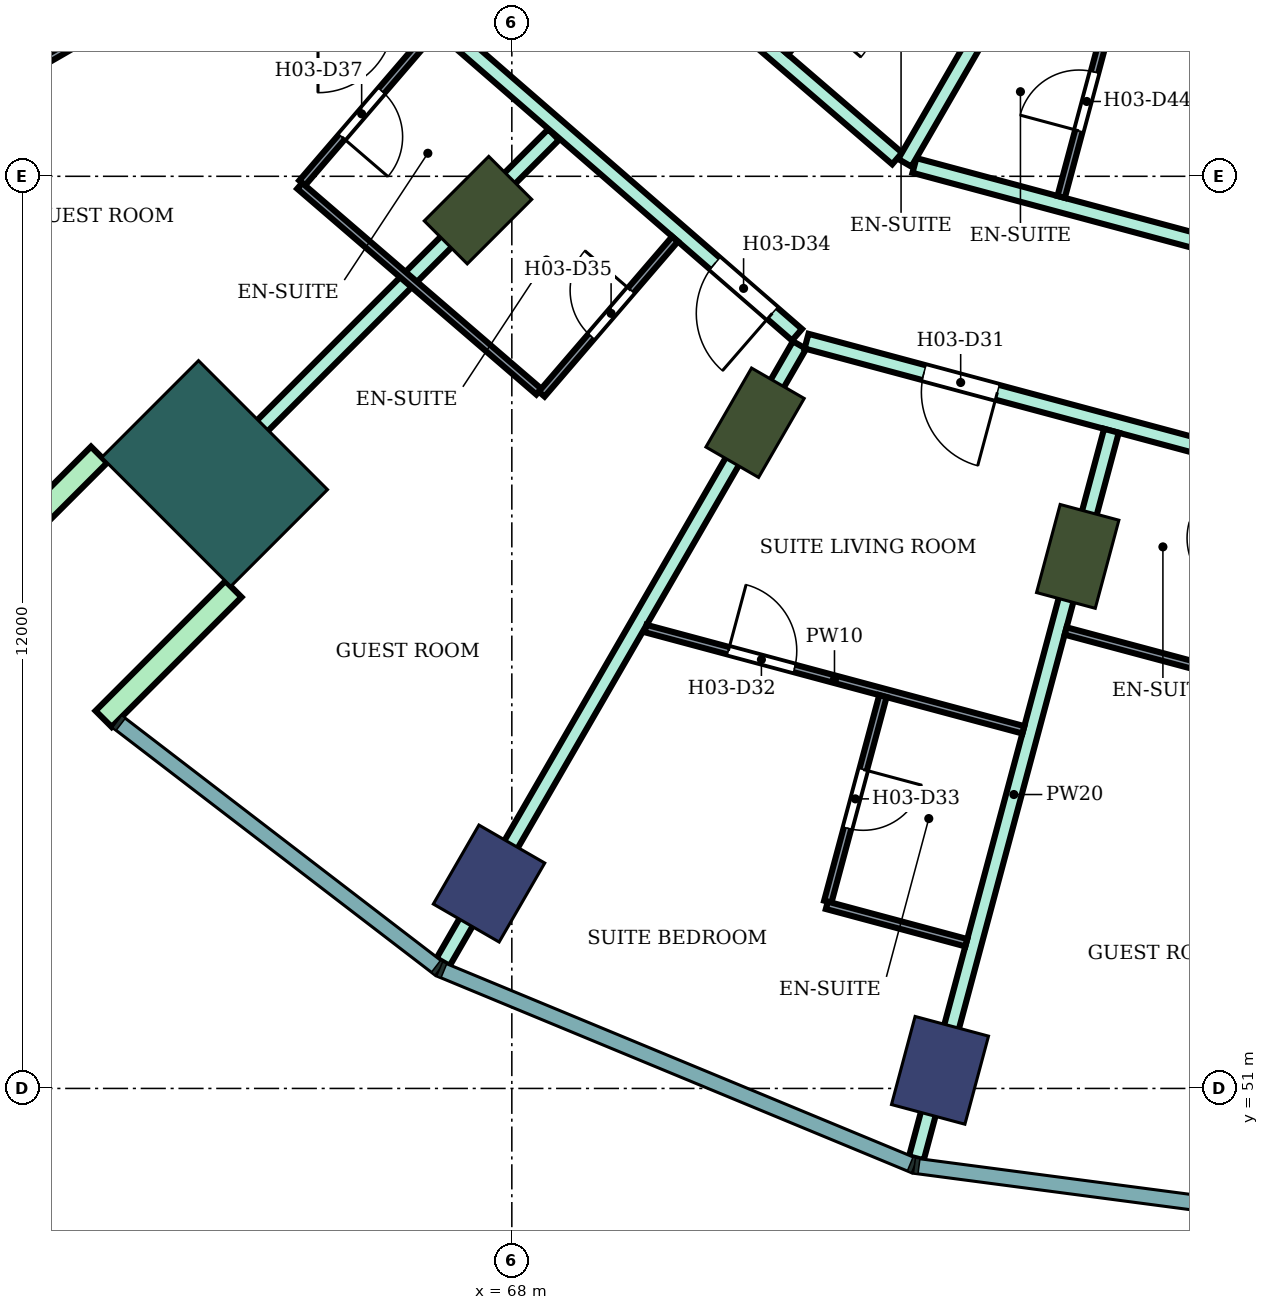
"""IFC4 building model, lengths in metres.
Left out: names, types, materials, properties, quantities, classifications, styles, units other than length and angle.
Written with IfcOpenShell. Run it as: python <this file> out.ifc"""

import sys

from ifc_helpers import new_model, si_unit, direction, frame, frame_2d, origin, origin_2d, place, context, subcontext, project, spatial, rectangle, extrude, element, fill, save


model = new_model("IFC4")
c1 = context("Model", 3, precision=1e-05, world=origin(), true_north=direction((0.0, 1.0)))
c2 = subcontext(c1, "Body", "Model", "MODEL_VIEW")
j1 = project(units=[si_unit("LENGTHUNIT", "METRE"), si_unit("PLANEANGLEUNIT", "RADIAN")], contexts=[c1])
p1 = place(None, origin())
s1 = spatial("IfcSite", under=j1, at=p1, CompositionType="ELEMENT")
p2 = place(p1, origin())
s2 = spatial("IfcBuilding", under=s1, at=p2, CompositionType="ELEMENT")
p3 = place(p2, frame((0.0, 0.0, 59.2)))
s3 = spatial("IfcBuildingStorey", under=s2, at=p3, CompositionType="ELEMENT", Elevation=59.2)
for number, where, z_axis, x_axis in (
    (1, (67.7, 53.696, 0.0), (0.0, 0.0, 1.0), (-0.5, -0.866, 0.0)),
    (2, (73.633, 51.238, 0.0), (0.0, 0.0, 1.0), (-0.259, -0.966, 0.0)),
):
    element("IfcColumn", number, at=place(p3, frame(where, z_axis=z_axis, x_axis=x_axis)), inside=s3, PredefinedType="COLUMN", context=c2, shape_type="SweptSolid", body=[
        extrude(rectangle(XDim=1.2, YDim=1.0, at=origin_2d()), origin(), (0.0, 0.0, 1.0), 3.8),
    ])
for number, where, z_axis, x_axis in (
    (3, (67.555, 62.555, 0.0), (0.0, 0.0, 1.0), (-0.707, -0.707, 0.0)),
    (4, (71.2, 59.758, 0.0), (0.0, 0.0, 1.0), (-0.5, -0.866, 0.0)),
    (5, (75.445, 58.0, 0.0), (0.0, 0.0, 1.0), (-0.259, -0.966, 0.0)),
):
    element("IfcColumn", number, at=place(p3, frame(where, z_axis=z_axis, x_axis=x_axis)), inside=s3, PredefinedType="COLUMN", context=c2, shape_type="SweptSolid", body=[
        extrude(rectangle(XDim=1.2, YDim=0.8, at=origin_2d()), origin(), (0.0, 0.0, 1.0), 3.8),
    ])
p4 = place(p3, frame((64.09, 59.09, 0.0), z_axis=(0.0, 0.0, 1.0), x_axis=(-0.707106781187, -0.707106781187, 0.0)))
e6 = element("IfcColumn", 6, at=p4, inside=s3, PredefinedType="COLUMN", context=c2, shape_type="SweptSolid", body=[
    extrude(rectangle(XDim=1.8, YDim=2.4, at=origin_2d()), origin(), (0.0, 0.0, 1.0), 3.8),
])
for number, where, z_axis, x_axis in (
    (7, (62.57, 59.338, 0.0), (0.0, 0.0, 1.0), (-0.707, -0.707, 0.0)),
    (8, (64.338, 57.57, 0.0), (0.0, 0.0, 1.0), (-0.707, -0.707, 0.0)),
):
    element("IfcWall", number, at=place(p3, frame(where, z_axis=z_axis, x_axis=x_axis)), inside=s3, PredefinedType="NOTDEFINED", context=c2, shape_type="SweptSolid", body=[
        extrude(rectangle(XDim=2.416, YDim=0.3, at=frame_2d((1.208, 0.0))), origin(), (0.0, 0.0, 1.0), 3.8),
    ])
p5 = place(p3, frame((63.596, 58.596, 0.0), z_axis=(0.0, 0.0, 1.0), x_axis=(0.707106781187, 0.707106781187, 0.0)))
e9 = element("IfcWall", 9, at=p5, inside=s3, PredefinedType="PARTITIONING", context=c2, shape_type="SweptSolid", body=[
    extrude(rectangle(XDim=7.005, YDim=0.2, at=frame_2d((3.503, 0.0))), origin(), (0.0, 0.0, 1.0), 3.35),
])
p6 = place(p3, frame((67.081, 64.971, 0.0), z_axis=(0.0, 0.0, 1.0), x_axis=(0.755031061605, -0.65568902386, 0.0)))
e10 = element("IfcWall", 10, at=p6, inside=s3, PredefinedType="PARTITIONING", context=c2, shape_type="SweptSolid", body=[
    extrude(rectangle(XDim=6.186, YDim=0.2, at=frame_2d((3.093, 0.0))), origin(), (0.0, 0.0, 1.0), 3.35),
])
p7 = place(p6, frame((4.755, 0.0, 0.0)))
e11 = element("IfcOpeningElement", 11, at=p7, cuts=e10, PredefinedType="OPENING", context=c2, shape_type="SweptSolid", body=[
    extrude(rectangle(XDim=1.0, YDim=2.1, at=frame_2d((0.5, 1.05))), frame((0.0, 0.11, 0.0), z_axis=(0.0, -1.0, 0.0), x_axis=(1.0, 0.0, 0.0)), (0.0, 0.0, 1.0), 0.22),
])
p8 = place(p3, frame((67.095, 52.662, 0.0), z_axis=(0.0, 0.0, 1.0), x_axis=(0.500247659952, 0.865882370021, 0.0)))
e12 = element("IfcWall", 12, at=p8, inside=s3, PredefinedType="PARTITIONING", context=c2, shape_type="SweptSolid", body=[
    extrude(rectangle(XDim=9.375, YDim=0.2, at=frame_2d((4.688, 0.0))), origin(), (0.0, 0.0, 1.0), 3.35),
])
p9 = place(p3, frame((69.158, 66.6, 0.0), z_axis=(0.0, 0.0, 1.0), x_axis=(0.757976058094, -0.652282373943, 0.0)))
e13 = element("IfcWall", 13, at=p9, inside=s3, PredefinedType="PARTITIONING", context=c2, shape_type="SweptSolid", body=[
    extrude(rectangle(XDim=5.16, YDim=0.2, at=frame_2d((2.58, 0.0))), origin(), (0.0, 0.0, 1.0), 3.35),
])
p10 = place(p9, frame((1.6, 0.0, 0.0)))
e14 = element("IfcOpeningElement", 14, at=p10, cuts=e13, PredefinedType="OPENING", context=c2, shape_type="SweptSolid", body=[
    extrude(rectangle(XDim=1.0, YDim=2.1, at=frame_2d((0.5, 1.05))), frame((0.0, 0.11, 0.0), z_axis=(0.0, -1.0, 0.0), x_axis=(1.0, 0.0, 0.0)), (0.0, 0.0, 1.0), 0.22),
])
p11 = place(p3, frame((71.877, 60.831, 0.0), z_axis=(0.0, 0.0, 1.0), x_axis=(0.965852509869, -0.259092510851, 0.0)))
e15 = element("IfcWall", 15, at=p11, inside=s3, PredefinedType="PARTITIONING", context=c2, shape_type="SweptSolid", body=[
    extrude(rectangle(XDim=8.32, YDim=0.2, at=frame_2d((4.16, 0.0))), origin(), (0.0, 0.0, 1.0), 3.35),
])
p12 = place(p11, frame((6.86, 0.0, 0.0)))
e16 = element("IfcOpeningElement", 16, at=p12, cuts=e15, PredefinedType="OPENING", context=c2, shape_type="SweptSolid", body=[
    extrude(rectangle(XDim=1.0, YDim=2.1, at=frame_2d((0.5, 1.05))), frame((0.0, 0.11, 0.0), z_axis=(0.0, -1.0, 0.0), x_axis=(1.0, 0.0, 0.0)), (0.0, 0.0, 1.0), 0.22),
])
p13 = place(p11, frame((1.6, 0.0, 0.0)))
e17 = element("IfcOpeningElement", 17, at=p13, cuts=e15, PredefinedType="OPENING", context=c2, shape_type="SweptSolid", body=[
    extrude(rectangle(XDim=1.0, YDim=2.1, at=frame_2d((0.5, 1.05))), frame((0.0, 0.11, 0.0), z_axis=(0.0, -1.0, 0.0), x_axis=(1.0, 0.0, 0.0)), (0.0, 0.0, 1.0), 0.22),
])
p14 = place(p3, frame((73.297, 63.143, 0.0), z_axis=(0.0, 0.0, 1.0), x_axis=(0.965859030528, -0.25906820173, 0.0)))
e18 = element("IfcWall", 18, at=p14, inside=s3, PredefinedType="PARTITIONING", context=c2, shape_type="SweptSolid", body=[
    extrude(rectangle(XDim=6.81, YDim=0.2, at=frame_2d((3.405, 0.0))), origin(), (0.0, 0.0, 1.0), 3.35),
])
p15 = place(p14, frame((5.39, 0.0, 0.0)))
e19 = element("IfcOpeningElement", 19, at=p15, cuts=e18, PredefinedType="OPENING", context=c2, shape_type="SweptSolid", body=[
    extrude(rectangle(XDim=1.0, YDim=2.1, at=frame_2d((0.5, 1.05))), frame((0.0, 0.11, 0.0), z_axis=(0.0, -1.0, 0.0), x_axis=(1.0, 0.0, 0.0)), (0.0, 0.0, 1.0), 0.22),
])
p16 = place(p3, frame((73.17, 63.177, 0.0), z_axis=(0.0, 0.0, 1.0), x_axis=(0.500239348149, 0.865887171959, 0.0)))
e20 = element("IfcWall", 20, at=p16, inside=s3, PredefinedType="PARTITIONING", context=c2, shape_type="SweptSolid", body=[
    extrude(rectangle(XDim=5.955, YDim=0.2, at=frame_2d((2.978, 0.0))), origin(), (0.0, 0.0, 1.0), 3.35),
])
p17 = place(p3, frame((73.322, 50.081, 0.0), z_axis=(0.0, 0.0, 1.0), x_axis=(0.25896431718, 0.965886889044, 0.0)))
e21 = element("IfcWall", 21, at=p17, inside=s3, PredefinedType="PARTITIONING", context=c2, shape_type="SweptSolid", body=[
    extrude(rectangle(XDim=9.909, YDim=0.2, at=frame_2d((4.955, 0.0))), origin(), (0.0, 0.0, 1.0), 3.35),
])
p18 = place(p3, frame((57.659, 62.101, 0.0), z_axis=(0.0, 0.0, 1.0), x_axis=(0.86602264145, 0.500004784474, 0.0)))
e22 = element("IfcWall", 22, at=p18, inside=s3, PredefinedType="PARTITIONING", context=c2, shape_type="SweptSolid", body=[
    extrude(rectangle(XDim=8.708, YDim=0.1, at=frame_2d((4.354, 0.0))), origin(), (0.0, 0.0, 1.0), 3.35),
])
p19 = place(p18, frame((3.929, 0.0, 0.0)))
e23 = element("IfcOpeningElement", 23, at=p19, cuts=e22, PredefinedType="OPENING", context=c2, shape_type="SweptSolid", body=[
    extrude(rectangle(XDim=0.9, YDim=2.1, at=frame_2d((0.45, 1.05))), frame((0.0, 0.06, 0.0), z_axis=(0.0, -1.0, 0.0), x_axis=(1.0, 0.0, 0.0)), (0.0, 0.0, 1.0), 0.12),
])
p20 = place(p3, frame((65.242, 62.912, 0.0), z_axis=(0.0, 0.0, 1.0), x_axis=(0.652069888227, 0.758158862553, 0.0)))
e24 = element("IfcWall", 24, at=p20, inside=s3, PredefinedType="PARTITIONING", context=c2, shape_type="SweptSolid", body=[
    extrude(rectangle(XDim=2.75, YDim=0.1, at=frame_2d((1.375, 0.0))), origin(), (0.0, 0.0, 1.0), 3.35),
])
p21 = place(p20, frame((0.8, 0.0, 0.0)))
e25 = element("IfcOpeningElement", 25, at=p21, cuts=e24, PredefinedType="OPENING", context=c2, shape_type="SweptSolid", body=[
    extrude(rectangle(XDim=0.8, YDim=2.1, at=frame_2d((0.4, 1.05))), frame((0.0, 0.06, 0.0), z_axis=(0.0, -1.0, 0.0), x_axis=(1.0, 0.0, 0.0)), (0.0, 0.0, 1.0), 0.12),
])
p22 = place(p3, frame((65.209, 62.875, 0.0), z_axis=(0.0, 0.0, 1.0), x_axis=(0.757930378138, -0.652335451969, 0.0)))
e26 = element("IfcWall", 26, at=p22, inside=s3, PredefinedType="PARTITIONING", context=c2, shape_type="SweptSolid", body=[
    extrude(rectangle(XDim=4.15, YDim=0.1, at=frame_2d((2.075, 0.0))), origin(), (0.0, 0.0, 1.0), 3.35),
])
p23 = place(p3, frame((68.393, 60.135, 0.0), z_axis=(0.0, 0.0, 1.0), x_axis=(0.652061182569, 0.758166349944, 0.0)))
e27 = element("IfcWall", 27, at=p23, inside=s3, PredefinedType="PARTITIONING", context=c2, shape_type="SweptSolid", body=[
    extrude(rectangle(XDim=2.69, YDim=0.1, at=frame_2d((1.345, 0.0))), origin(), (0.0, 0.0, 1.0), 3.35),
])
p24 = place(p23, frame((1.0, 0.0, 0.0)))
e28 = element("IfcOpeningElement", 28, at=p24, cuts=e27, PredefinedType="OPENING", context=c2, shape_type="SweptSolid", body=[
    extrude(rectangle(XDim=0.8, YDim=2.1, at=frame_2d((0.4, 1.05))), frame((0.0, 0.06, 0.0), z_axis=(0.0, -1.0, 0.0), x_axis=(1.0, 0.0, 0.0)), (0.0, 0.0, 1.0), 0.12),
])
p25 = place(p3, frame((69.76, 57.051, 0.0), z_axis=(0.0, 0.0, 1.0), x_axis=(0.965880475586, -0.258988236958, 0.0)))
e29 = element("IfcWall", 29, at=p25, inside=s3, PredefinedType="PARTITIONING", context=c2, shape_type="SweptSolid", body=[
    extrude(rectangle(XDim=5.146, YDim=0.1, at=frame_2d((2.573, 0.0))), origin(), (0.0, 0.0, 1.0), 3.35),
])
p26 = place(p25, frame((1.128, 0.0, 0.0)))
e30 = element("IfcOpeningElement", 30, at=p26, cuts=e29, PredefinedType="OPENING", context=c2, shape_type="SweptSolid", body=[
    extrude(rectangle(XDim=0.9, YDim=2.1, at=frame_2d((0.45, 1.05))), frame((0.0, 0.06, 0.0), z_axis=(0.0, -1.0, 0.0), x_axis=(1.0, 0.0, 0.0)), (0.0, 0.0, 1.0), 0.12),
])
p27 = place(p3, frame((71.596, 64.635, 0.0), z_axis=(0.0, 0.0, 1.0), x_axis=(0.652285007511, 0.757973791748, 0.0)))
e31 = element("IfcWall", 31, at=p27, inside=s3, PredefinedType="PARTITIONING", context=c2, shape_type="SweptSolid", body=[
    extrude(rectangle(XDim=2.65, YDim=0.1, at=frame_2d((1.325, 0.0))), origin(), (0.0, 0.0, 1.0), 3.35),
])
p28 = place(p27, frame((0.6, 0.0, 0.0)))
e32 = element("IfcOpeningElement", 32, at=p28, cuts=e31, PredefinedType="OPENING", context=c2, shape_type="SweptSolid", body=[
    extrude(rectangle(XDim=0.8, YDim=2.1, at=frame_2d((0.4, 1.05))), frame((0.0, 0.06, 0.0), z_axis=(0.0, -1.0, 0.0), x_axis=(1.0, 0.0, 0.0)), (0.0, 0.0, 1.0), 0.12),
])
p29 = place(p3, frame((72.157, 53.457, 0.0), z_axis=(0.0, 0.0, 1.0), x_axis=(0.258975798317, 0.965883810759, 0.0)))
e33 = element("IfcWall", 33, at=p29, inside=s3, PredefinedType="PARTITIONING", context=c2, shape_type="SweptSolid", body=[
    extrude(rectangle(XDim=2.8, YDim=0.1, at=frame_2d((1.4, 0.0))), origin(), (0.0, 0.0, 1.0), 3.35),
])
p30 = place(p29, frame((1.0, 0.0, 0.0)))
e34 = element("IfcOpeningElement", 34, at=p30, cuts=e33, PredefinedType="OPENING", context=c2, shape_type="SweptSolid", body=[
    extrude(rectangle(XDim=0.8, YDim=2.1, at=frame_2d((0.4, 1.05))), frame((0.0, 0.06, 0.0), z_axis=(0.0, -1.0, 0.0), x_axis=(1.0, 0.0, 0.0)), (0.0, 0.0, 1.0), 0.12),
])
p31 = place(p3, frame((72.144, 53.409, 0.0), z_axis=(0.0, 0.0, 1.0), x_axis=(0.965907902023, -0.258885930111, 0.0)))
e35 = element("IfcWall", 35, at=p31, inside=s3, PredefinedType="PARTITIONING", context=c2, shape_type="SweptSolid", body=[
    extrude(rectangle(XDim=1.9, YDim=0.1, at=frame_2d((0.95, 0.0))), origin(), (0.0, 0.0, 1.0), 3.35),
])
p32 = place(p3, frame((75.286, 57.018, 0.0), z_axis=(0.0, 0.0, 1.0), x_axis=(0.966003902934, -0.258527483095, 0.0)))
e36 = element("IfcWall", 36, at=p32, inside=s3, PredefinedType="PARTITIONING", context=c2, shape_type="SweptSolid", body=[
    extrude(rectangle(XDim=1.95, YDim=0.1, at=frame_2d((0.975, 0.0))), origin(), (0.0, 0.0, 1.0), 3.35),
])
p33 = place(p3, frame((75.227, 62.729, 0.0), z_axis=(0.0, 0.0, 1.0), x_axis=(0.258945475746, 0.965891940432, 0.0)))
e37 = element("IfcWall", 37, at=p33, inside=s3, PredefinedType="PARTITIONING", context=c2, shape_type="SweptSolid", body=[
    extrude(rectangle(XDim=2.7, YDim=0.1, at=frame_2d((1.35, 0.0))), origin(), (0.0, 0.0, 1.0), 3.35),
])
p34 = place(p33, frame((0.9, 0.0, 0.0)))
e38 = element("IfcOpeningElement", 38, at=p34, cuts=e37, PredefinedType="OPENING", context=c2, shape_type="SweptSolid", body=[
    extrude(rectangle(XDim=0.8, YDim=2.1, at=frame_2d((0.4, 1.05))), frame((0.0, 0.06, 0.0), z_axis=(0.0, -1.0, 0.0), x_axis=(1.0, 0.0, 0.0)), (0.0, 0.0, 1.0), 0.12),
])
p35 = place(p13, frame((1.0, 0.0, 0.0), z_axis=(0.0, 0.0, 1.0), x_axis=(-1.0, 0.0, 0.0)))
e39 = element("IfcDoor", 39, at=p35, inside=s3, OperationType="SINGLE_SWING_LEFT", PredefinedType="DOOR", context=c2, shape_type="SweptSolid", body=[
    extrude(rectangle(XDim=1.0, YDim=2.1, at=frame_2d((0.5, 1.05))), frame((0.0, 0.025, 0.0), z_axis=(0.0, -1.0, 0.0), x_axis=(1.0, 0.0, 0.0)), (0.0, 0.0, 1.0), 0.05),
])
fill(e17, e39)
p36 = place(p26, origin())
e40 = element("IfcDoor", 40, at=p36, inside=s3, OperationType="SINGLE_SWING_LEFT", PredefinedType="DOOR", context=c2, shape_type="SweptSolid", body=[
    extrude(rectangle(XDim=0.9, YDim=2.1, at=frame_2d((0.45, 1.05))), frame((0.0, 0.025, 0.0), z_axis=(0.0, -1.0, 0.0), x_axis=(1.0, 0.0, 0.0)), (0.0, 0.0, 1.0), 0.05),
])
fill(e30, e40)
p37 = place(p30, frame((0.8, 0.0, 0.0), z_axis=(0.0, 0.0, 1.0), x_axis=(-1.0, 0.0, 0.0)))
e41 = element("IfcDoor", 41, at=p37, inside=s3, OperationType="SINGLE_SWING_LEFT", PredefinedType="DOOR", context=c2, shape_type="SweptSolid", body=[
    extrude(rectangle(XDim=0.8, YDim=2.1, at=frame_2d((0.4, 1.05))), frame((0.0, 0.025, 0.0), z_axis=(0.0, -1.0, 0.0), x_axis=(1.0, 0.0, 0.0)), (0.0, 0.0, 1.0), 0.05),
])
fill(e34, e41)
p38 = place(p7, frame((1.0, 0.0, 0.0), z_axis=(0.0, 0.0, 1.0), x_axis=(-1.0, 0.0, 0.0)))
e42 = element("IfcDoor", 42, at=p38, inside=s3, OperationType="SINGLE_SWING_LEFT", PredefinedType="DOOR", context=c2, shape_type="SweptSolid", body=[
    extrude(rectangle(XDim=1.0, YDim=2.1, at=frame_2d((0.5, 1.05))), frame((0.0, 0.025, 0.0), z_axis=(0.0, -1.0, 0.0), x_axis=(1.0, 0.0, 0.0)), (0.0, 0.0, 1.0), 0.05),
])
fill(e11, e42)
p39 = place(p24, origin())
e43 = element("IfcDoor", 43, at=p39, inside=s3, OperationType="SINGLE_SWING_RIGHT", PredefinedType="DOOR", context=c2, shape_type="SweptSolid", body=[
    extrude(rectangle(XDim=0.8, YDim=2.1, at=frame_2d((0.4, 1.05))), frame((0.0, 0.025, 0.0), z_axis=(0.0, -1.0, 0.0), x_axis=(1.0, 0.0, 0.0)), (0.0, 0.0, 1.0), 0.05),
])
fill(e28, e43)
p40 = place(p21, frame((0.8, 0.0, 0.0), z_axis=(0.0, 0.0, 1.0), x_axis=(-1.0, 0.0, 0.0)))
e44 = element("IfcDoor", 44, at=p40, inside=s3, OperationType="SINGLE_SWING_RIGHT", PredefinedType="DOOR", context=c2, shape_type="SweptSolid", body=[
    extrude(rectangle(XDim=0.8, YDim=2.1, at=frame_2d((0.4, 1.05))), frame((0.0, 0.025, 0.0), z_axis=(0.0, -1.0, 0.0), x_axis=(1.0, 0.0, 0.0)), (0.0, 0.0, 1.0), 0.05),
])
fill(e25, e44)
p41 = place(p34, origin())
e45 = element("IfcDoor", 45, at=p41, inside=s3, OperationType="SINGLE_SWING_LEFT", PredefinedType="DOOR", context=c2, shape_type="SweptSolid", body=[
    extrude(rectangle(XDim=0.8, YDim=2.1, at=frame_2d((0.4, 1.05))), frame((0.0, 0.025, 0.0), z_axis=(0.0, -1.0, 0.0), x_axis=(1.0, 0.0, 0.0)), (0.0, 0.0, 1.0), 0.05),
])
fill(e38, e45)
save(model, sys.argv[1])
